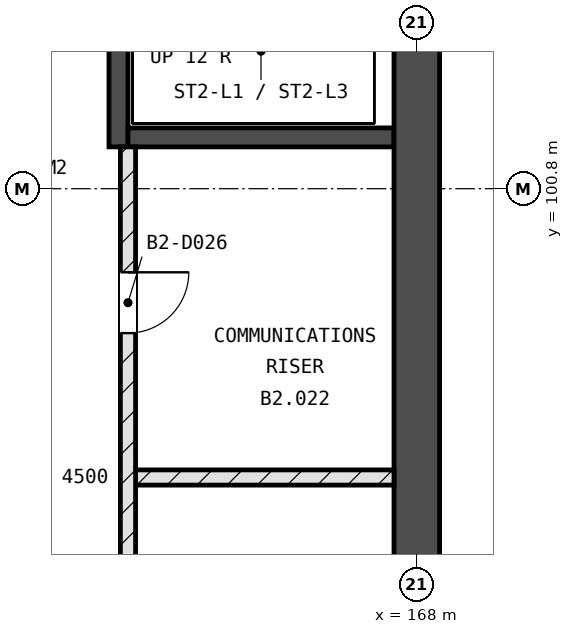
"""IFC4 building model, lengths in metres.
Left out: names, types, materials, properties, quantities, classifications, styles, units other than length and angle.
Written with IfcOpenShell. Run it as: python <this file> out.ifc"""

import sys

from ifc_helpers import new_model, si_unit, direction, frame, frame_2d, origin, place, context, subcontext, project, spatial, rectangle, extrude, element, fill, save


model = new_model("IFC4")
c1 = context("Model", 3, precision=1e-05, world=origin(), true_north=direction((0.0, 1.0)))
c2 = subcontext(c1, "Body", "Model", "MODEL_VIEW")
j1 = project(units=[si_unit("LENGTHUNIT", "METRE"), si_unit("PLANEANGLEUNIT", "RADIAN")], contexts=[c1])
p1 = place(None, origin())
s1 = spatial("IfcSite", under=j1, at=p1, CompositionType="ELEMENT")
p2 = place(p1, origin())
s2 = spatial("IfcBuilding", under=s1, at=p2, CompositionType="ELEMENT")
p3 = place(p2, frame((0.0, 0.0, -9.6)))
s3 = spatial("IfcBuildingStorey", under=s2, at=p3, CompositionType="ELEMENT", Elevation=-9.6)
p4 = place(p3, frame((164.075, 101.35, -0.25), z_axis=(0.0, 0.0, 1.0), x_axis=(0.0, 1.0, 0.0)))
e1 = element("IfcWall", 1, at=p4, inside=s3, PredefinedType="SHEAR", context=c2, shape_type="SweptSolid", body=[
    extrude(rectangle(XDim=7.6, YDim=0.25, at=frame_2d((3.8, 0.0))), origin(), (0.0, 0.0, 1.0), 4.75),
])
p5 = place(p4, frame((6.5, 0.0, 0.25)))
e2 = element("IfcOpeningElement", 2, at=p5, cuts=e1, PredefinedType="OPENING", context=c2, shape_type="SweptSolid", body=[
    extrude(rectangle(XDim=1.0, YDim=2.1, at=frame_2d((0.5, 1.05))), frame((0.0, 0.135, 0.0), z_axis=(0.0, -1.0, 0.0), x_axis=(1.0, 0.0, 0.0)), (0.0, 0.0, 1.0), 0.27),
])
p6 = place(p3, frame((164.2, 101.475, -0.25), z_axis=(0.0, 0.0, 1.0), x_axis=(1.0, 0.0, 0.0)))
e3 = element("IfcWall", 3, at=p6, inside=s3, PredefinedType="SHEAR", context=c2, shape_type="SweptSolid", body=[
    extrude(rectangle(XDim=3.5, YDim=0.25, at=frame_2d((1.75, 0.0))), origin(), (0.0, 0.0, 1.0), 4.75),
])
p7 = place(p3, frame((168.0, -0.3, -0.25), z_axis=(0.0, 0.0, 1.0), x_axis=(0.0, 1.0, 0.0)))
e4 = element("IfcWall", 4, at=p7, inside=s3, PredefinedType="SOLIDWALL", context=c2, shape_type="SweptSolid", body=[
    extrude(rectangle(XDim=118.2, YDim=0.6, at=frame_2d((59.1, 0.0))), origin(), (0.0, 0.0, 1.0), 4.75),
])
p8 = place(p3, frame((164.3, 97.0, 0.0), z_axis=(0.0, 0.0, 1.0), x_axis=(1.0, 0.0, 0.0)))
e5 = element("IfcWall", 5, at=p8, inside=s3, PredefinedType="SOLIDWALL", context=c2, shape_type="SweptSolid", body=[
    extrude(rectangle(XDim=3.4, YDim=0.2, at=frame_2d((1.7, 0.0))), origin(), (0.0, 0.0, 1.0), 4.5),
])
p9 = place(p3, frame((164.2, 92.65, 0.0), z_axis=(0.0, 0.0, 1.0), x_axis=(0.0, 1.0, 0.0)))
e6 = element("IfcWall", 6, at=p9, inside=s3, PredefinedType="SOLIDWALL", context=c2, shape_type="SweptSolid", body=[
    extrude(rectangle(XDim=8.7, YDim=0.2, at=frame_2d((4.35, 0.0))), origin(), (0.0, 0.0, 1.0), 4.5),
])
p10 = place(p9, frame((1.65, 0.0, 0.0)))
e7 = element("IfcOpeningElement", 7, at=p10, cuts=e6, PredefinedType="OPENING", context=c2, shape_type="SweptSolid", body=[
    extrude(rectangle(XDim=0.8, YDim=2.1, at=frame_2d((0.4, 1.05))), frame((0.0, 0.11, 0.0), z_axis=(0.0, -1.0, 0.0), x_axis=(1.0, 0.0, 0.0)), (0.0, 0.0, 1.0), 0.22),
])
p11 = place(p9, frame((6.25, 0.0, 0.0)))
e8 = element("IfcOpeningElement", 8, at=p11, cuts=e6, PredefinedType="OPENING", context=c2, shape_type="SweptSolid", body=[
    extrude(rectangle(XDim=0.8, YDim=2.1, at=frame_2d((0.4, 1.05))), frame((0.0, 0.11, 0.0), z_axis=(0.0, -1.0, 0.0), x_axis=(1.0, 0.0, 0.0)), (0.0, 0.0, 1.0), 0.22),
])
p12 = place(p11, origin())
e9 = element("IfcDoor", 9, at=p12, inside=s3, OperationType="SINGLE_SWING_RIGHT", PredefinedType="DOOR", context=c2, shape_type="SweptSolid", body=[
    extrude(rectangle(XDim=0.8, YDim=2.1, at=frame_2d((0.4, 1.05))), frame((0.0, 0.025, 0.0), z_axis=(0.0, -1.0, 0.0), x_axis=(1.0, 0.0, 0.0)), (0.0, 0.0, 1.0), 0.05),
])
fill(e8, e9)
save(model, sys.argv[1])
